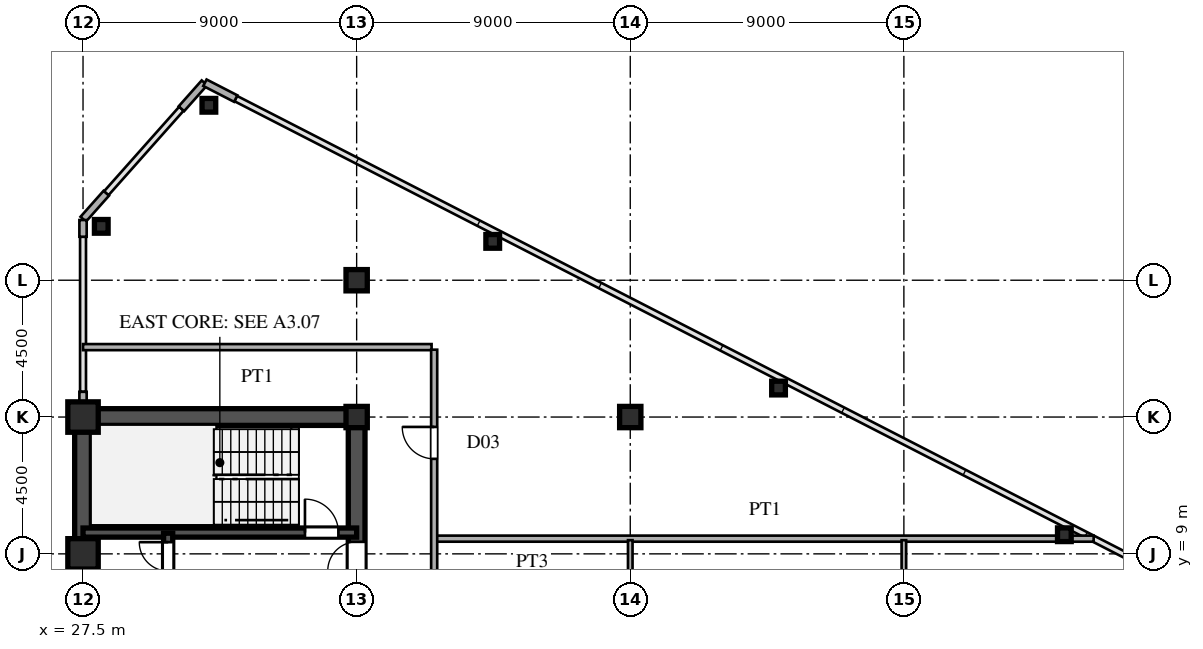
"""IFC4 building model, lengths in metres.
Left out: names, types, materials, properties, quantities, classifications, styles, units other than length and angle.
Written with IfcOpenShell. Run it as: python <this file> out.ifc"""

import sys

from ifc_helpers import new_model, si_unit, direction, frame, frame_2d, origin, origin_2d, place, context, subcontext, project, spatial, rectangle, hollow_rectangle, i_section, extrude, source, transform, mapped, element, fill, save


model = new_model("IFC4")
c1 = context("Model", 3, precision=1e-05, world=origin(), true_north=direction((0.0, 1.0)))
c2 = subcontext(c1, "Body", "Model", "MODEL_VIEW")
j1 = project(units=[si_unit("LENGTHUNIT", "METRE"), si_unit("PLANEANGLEUNIT", "RADIAN")], contexts=[c1])
p1 = place(None, origin())
s1 = spatial("IfcSite", under=j1, at=p1, CompositionType="ELEMENT")
p2 = place(p1, origin())
s2 = spatial("IfcBuilding", under=s1, at=p2, CompositionType="ELEMENT")
p3 = place(p2, frame((0.0, 0.0, 144.0)))
s3 = spatial("IfcBuildingStorey", under=s2, at=p3, CompositionType="ELEMENT", Elevation=144.0)
m1 = source(origin(), c2, "Body", "SweptSolid", [
    extrude(hollow_rectangle(XDim=1.0, YDim=1.0, WallThickness=0.042, at=origin_2d()), origin(), (0.0, 0.0, 1.0), 3.6),
])
for number, where, z_axis, x_axis in (
    (1, (27.5, 9.0, 0.0), (0.0, 0.0, 1.0), (1.0, 0.0, 0.0)),
    (2, (27.5, 13.5, 0.0), (0.0, 0.0, 1.0), (1.0, 0.0, 0.0)),
):
    element("IfcColumn", number, at=place(p3, frame(where, z_axis=z_axis, x_axis=x_axis)), inside=s3, PredefinedType="COLUMN", context=c2, shape_type="MappedRepresentation", body=[
        mapped(m1, transform((0.0, 0.0, 0.0), scale=1.0)),
    ])
m2 = source(origin(), c2, "Body", "SweptSolid", [
    extrude(i_section(OverallWidth=0.7, OverallDepth=0.7, WebThickness=0.028, FlangeThickness=0.045, at=origin_2d()), origin(), (0.0, 0.0, 1.0), 3.6),
])
for number, where, z_axis, x_axis in (
    (3, (36.5, 13.5, 0.0), (0.0, 0.0, 1.0), (1.0, 0.0, 0.0)),
    (4, (36.5, 18.0, 0.0), (0.0, 0.0, 1.0), (1.0, 0.0, 0.0)),
    (5, (45.5, 13.5, 0.0), (0.0, 0.0, 1.0), (1.0, 0.0, 0.0)),
):
    element("IfcColumn", number, at=place(p3, frame(where, z_axis=z_axis, x_axis=x_axis)), inside=s3, PredefinedType="COLUMN", context=c2, shape_type="MappedRepresentation", body=[
        mapped(m2, transform((0.0, 0.0, 0.0), scale=1.0)),
    ])
m3 = source(origin(), c2, "Body", "SweptSolid", [
    extrude(hollow_rectangle(XDim=0.45, YDim=0.45, WallThickness=0.018, at=origin_2d()), origin(), (0.0, 0.0, 1.0), 3.6),
])
for number, where, z_axis, x_axis in (
    (6, (31.64, 23.754, 0.0), (0.0, 0.0, 1.0), (1.0, 0.0, 0.0)),
    (7, (28.1, 19.772, 0.0), (0.0, 0.0, 1.0), (1.0, 0.0, 0.0)),
    (8, (40.976, 19.278, 0.0), (0.0, 0.0, 1.0), (1.0, 0.0, 0.0)),
    (9, (50.377, 14.453, 0.0), (0.0, 0.0, 1.0), (1.0, 0.0, 0.0)),
    (10, (59.779, 9.629, 0.0), (0.0, 0.0, 1.0), (1.0, 0.0, 0.0)),
):
    element("IfcColumn", number, at=place(p3, frame(where, z_axis=z_axis, x_axis=x_axis)), inside=s3, PredefinedType="COLUMN", context=c2, shape_type="MappedRepresentation", body=[
        mapped(m3, transform((0.0, 0.0, 0.0), scale=1.0)),
    ])
p4 = place(p3, frame((32.523, 23.975, 0.0), z_axis=(0.0, 0.0, 1.0), x_axis=(-0.889797395748, 0.456355776255, 0.0)))
e11 = element("IfcWall", 11, at=p4, inside=s3, PredefinedType="SOLIDWALL", context=c2, shape_type="SweptSolid", body=[
    extrude(rectangle(XDim=1.14, YDim=0.24, at=frame_2d((0.57, 0.0))), origin(), (0.0, 0.0, 1.0), 3.38),
])
for number, where, z_axis, x_axis in (
    (12, (31.493, 24.492, 0.0), (0.0, 0.0, 1.0), (-0.664, -0.747, 0.0)),
    (13, (28.264, 20.86, 0.0), (0.0, 0.0, 1.0), (-0.664, -0.747, 0.0)),
):
    element("IfcWall", number, at=place(p3, frame(where, z_axis=z_axis, x_axis=x_axis)), inside=s3, PredefinedType="SOLIDWALL", context=c2, shape_type="SweptSolid", body=[
        extrude(rectangle(XDim=1.14, YDim=0.24, at=frame_2d((0.57, 0.0))), origin(), (0.0, 0.0, 1.0), 3.38),
    ])
p5 = place(p3, frame((27.5, 13.78, 0.0), z_axis=(0.0, 0.0, 1.0), x_axis=(0.0, 1.0, 0.0)))
e14 = element("IfcWall", 14, at=p5, inside=s3, PredefinedType="SOLIDWALL", context=c2, shape_type="SweptSolid", body=[
    extrude(rectangle(XDim=0.55, YDim=0.24, at=frame_2d((0.275, 0.0))), origin(), (0.0, 0.0, 1.0), 2.88),
])
p6 = place(p3, frame((27.5, 19.43, 0.0), z_axis=(0.0, 0.0, 1.0), x_axis=(0.0, 1.0, 0.0)))
e15 = element("IfcWall", 15, at=p6, inside=s3, PredefinedType="SOLIDWALL", context=c2, shape_type="SweptSolid", body=[
    extrude(rectangle(XDim=0.55, YDim=0.24, at=frame_2d((0.275, 0.0))), origin(), (0.0, 0.0, 1.0), 3.38),
])
p7 = place(p3, frame((27.5, 1.3, 0.0), z_axis=(0.0, 0.0, 1.0), x_axis=(0.0, 1.0, 0.0)))
e16 = element("IfcWall", 16, at=p7, inside=s3, PredefinedType="SHEAR", context=c2, shape_type="SweptSolid", body=[
    extrude(rectangle(XDim=12.2, YDim=0.55, at=frame_2d((6.1, 0.0))), origin(), (0.0, 0.0, 1.0), 3.38),
])
p8 = place(p3, frame((27.5, 13.5, 0.0), z_axis=(0.0, 0.0, 1.0), x_axis=(1.0, 0.0, 0.0)))
e17 = element("IfcWall", 17, at=p8, inside=s3, PredefinedType="SHEAR", context=c2, shape_type="SweptSolid", body=[
    extrude(rectangle(XDim=9.0, YDim=0.55, at=frame_2d((4.5, 0.0))), origin(), (0.0, 0.0, 1.0), 3.38),
])
p9 = place(p3, frame((36.5, 8.2, 0.0), z_axis=(0.0, 0.0, 1.0), x_axis=(0.0, 1.0, 0.0)))
e18 = element("IfcWall", 18, at=p9, inside=s3, PredefinedType="SHEAR", context=c2, shape_type="SweptSolid", body=[
    extrude(rectangle(XDim=5.45, YDim=0.55, at=frame_2d((2.725, 0.0))), origin(), (0.0, 0.0, 1.0), 3.38),
])
p10 = place(p9, frame((0.245, 0.0, 0.0)))
e19 = element("IfcOpeningElement", 19, at=p10, cuts=e18, PredefinedType="OPENING", context=c2, shape_type="SweptSolid", body=[
    extrude(rectangle(XDim=0.95, YDim=2.15, at=frame_2d((0.475, 1.075))), frame((0.0, 0.285, 0.0), z_axis=(0.0, -1.0, 0.0), x_axis=(1.0, 0.0, 0.0)), (0.0, 0.0, 1.0), 0.57),
])
p11 = place(p3, frame((27.5, 9.7, 0.0), z_axis=(0.0, 0.0, 1.0), x_axis=(1.0, 0.0, 0.0)))
e20 = element("IfcWall", 20, at=p11, inside=s3, PredefinedType="SHEAR", context=c2, shape_type="SweptSolid", body=[
    extrude(rectangle(XDim=9.0, YDim=0.3, at=frame_2d((4.5, 0.0))), origin(), (0.0, 0.0, 1.0), 3.38),
])
p12 = place(p11, frame((7.3, 0.0, 0.0)))
e21 = element("IfcOpeningElement", 21, at=p12, cuts=e20, PredefinedType="OPENING", context=c2, shape_type="SweptSolid", body=[
    extrude(rectangle(XDim=1.1, YDim=2.2, at=frame_2d((0.55, 1.1))), frame((0.0, 0.16, 0.0), z_axis=(0.0, -1.0, 0.0), x_axis=(1.0, 0.0, 0.0)), (0.0, 0.0, 1.0), 0.32),
])
p13 = place(p3, frame((30.3, 8.15, 0.0), z_axis=(0.0, 0.0, 1.0), x_axis=(0.0, 1.0, 0.0)))
e22 = element("IfcWall", 22, at=p13, inside=s3, PredefinedType="SHEAR", context=c2, shape_type="SweptSolid", body=[
    extrude(rectangle(XDim=1.53, YDim=0.3, at=frame_2d((0.765, 0.0))), origin(), (0.0, 0.0, 1.0), 3.38),
])
p14 = place(p13, frame((0.285, 0.0, 0.0)))
e23 = element("IfcOpeningElement", 23, at=p14, cuts=e22, PredefinedType="OPENING", context=c2, shape_type="SweptSolid", body=[
    extrude(rectangle(XDim=0.95, YDim=2.15, at=frame_2d((0.475, 1.075))), frame((0.0, 0.16, 0.0), z_axis=(0.0, -1.0, 0.0), x_axis=(1.0, 0.0, 0.0)), (0.0, 0.0, 1.0), 0.32),
])
p15 = place(p3, frame((39.13, 9.5, 0.0), z_axis=(0.0, 0.0, 1.0), x_axis=(1.0, 0.0, 0.0)))
e24 = element("IfcWall", 24, at=p15, inside=s3, PredefinedType="PARTITIONING", context=c2, shape_type="SweptSolid", body=[
    extrude(rectangle(XDim=21.612, YDim=0.2, at=frame_2d((10.806, 0.0))), origin(), (0.0, 0.0, 1.0), 3.38),
])
p16 = place(p3, frame((27.5, 15.8, 0.0), z_axis=(0.0, 0.0, 1.0), x_axis=(1.0, 0.0, 0.0)))
e25 = element("IfcWall", 25, at=p16, inside=s3, PredefinedType="PARTITIONING", context=c2, shape_type="SweptSolid", body=[
    extrude(rectangle(XDim=11.465, YDim=0.2, at=frame_2d((5.732, 0.0))), origin(), (0.0, 0.0, 1.0), 3.38),
])
p17 = place(p3, frame((39.05, -15.715, 0.0), z_axis=(0.0, 0.0, 1.0), x_axis=(0.0, 1.0, 0.0)))
e26 = element("IfcWall", 26, at=p17, inside=s3, PredefinedType="PARTITIONING", context=c2, shape_type="SweptSolid", body=[
    extrude(rectangle(XDim=31.43, YDim=0.2, at=frame_2d((15.715, 0.0))), origin(), (0.0, 0.0, 1.0), 3.38),
])
p18 = place(p17, frame((1.54, 0.0, 0.0)))
e27 = element("IfcOpeningElement", 27, at=p18, cuts=e26, PredefinedType="OPENING", context=c2, shape_type="SweptSolid", body=[
    extrude(rectangle(XDim=1.05, YDim=2.25, at=frame_2d((0.525, 1.125))), frame((0.0, 0.11, 0.0), z_axis=(0.0, -1.0, 0.0), x_axis=(1.0, 0.0, 0.0)), (0.0, 0.0, 1.0), 0.22),
])
p19 = place(p17, frame((8.782, 0.0, 0.0)))
e28 = element("IfcOpeningElement", 28, at=p19, cuts=e26, PredefinedType="OPENING", context=c2, shape_type="SweptSolid", body=[
    extrude(rectangle(XDim=1.05, YDim=2.25, at=frame_2d((0.525, 1.125))), frame((0.0, 0.11, 0.0), z_axis=(0.0, -1.0, 0.0), x_axis=(1.0, 0.0, 0.0)), (0.0, 0.0, 1.0), 0.22),
])
p20 = place(p17, frame((19.282, 0.0, 0.0)))
e29 = element("IfcOpeningElement", 29, at=p20, cuts=e26, PredefinedType="OPENING", context=c2, shape_type="SweptSolid", body=[
    extrude(rectangle(XDim=1.05, YDim=2.25, at=frame_2d((0.525, 1.125))), frame((0.0, 0.11, 0.0), z_axis=(0.0, -1.0, 0.0), x_axis=(1.0, 0.0, 0.0)), (0.0, 0.0, 1.0), 0.22),
])
p21 = place(p17, frame((27.84, 0.0, 0.0)))
e30 = element("IfcOpeningElement", 30, at=p21, cuts=e26, PredefinedType="OPENING", context=c2, shape_type="SweptSolid", body=[
    extrude(rectangle(XDim=1.05, YDim=2.25, at=frame_2d((0.525, 1.125))), frame((0.0, 0.11, 0.0), z_axis=(0.0, -1.0, 0.0), x_axis=(1.0, 0.0, 0.0)), (0.0, 0.0, 1.0), 0.22),
])
p22 = place(p3, frame((45.5, 6.402, 0.0), z_axis=(0.0, 0.0, 1.0), x_axis=(0.0, 1.0, 0.0)))
e31 = element("IfcWall", 31, at=p22, inside=s3, PredefinedType="PARTITIONING", context=c2, shape_type="SweptSolid", body=[
    extrude(rectangle(XDim=3.048, YDim=0.15, at=frame_2d((1.524, 0.0))), origin(), (0.0, 0.0, 1.0), 2.78),
])
p23 = place(p3, frame((54.5, -11.45, 0.0), z_axis=(0.0, 0.0, 1.0), x_axis=(0.0, 1.0, 0.0)))
e32 = element("IfcWall", 32, at=p23, inside=s3, PredefinedType="PARTITIONING", context=c2, shape_type="SweptSolid", body=[
    extrude(rectangle(XDim=20.9, YDim=0.15, at=frame_2d((10.45, 0.0))), origin(), (0.0, 0.0, 1.0), 2.78),
])
p24 = place(p23, frame((4.725, 0.0, 0.0)))
e33 = element("IfcOpeningElement", 33, at=p24, cuts=e32, PredefinedType="OPENING", context=c2, shape_type="SweptSolid", body=[
    extrude(rectangle(XDim=0.95, YDim=2.15, at=frame_2d((0.475, 1.075))), frame((0.0, 0.085, 0.0), z_axis=(0.0, -1.0, 0.0), x_axis=(1.0, 0.0, 0.0)), (0.0, 0.0, 1.0), 0.17),
])
p25 = place(p23, frame((1.225, 0.0, 0.0)))
e34 = element("IfcOpeningElement", 34, at=p25, cuts=e32, PredefinedType="OPENING", context=c2, shape_type="SweptSolid", body=[
    extrude(rectangle(XDim=0.95, YDim=2.15, at=frame_2d((0.475, 1.075))), frame((0.0, 0.085, 0.0), z_axis=(0.0, -1.0, 0.0), x_axis=(1.0, 0.0, 0.0)), (0.0, 0.0, 1.0), 0.17),
])
p26 = place(p23, frame((8.225, 0.0, 0.0)))
e35 = element("IfcOpeningElement", 35, at=p26, cuts=e32, PredefinedType="OPENING", context=c2, shape_type="SweptSolid", body=[
    extrude(rectangle(XDim=0.95, YDim=2.15, at=frame_2d((0.475, 1.075))), frame((0.0, 0.085, 0.0), z_axis=(0.0, -1.0, 0.0), x_axis=(1.0, 0.0, 0.0)), (0.0, 0.0, 1.0), 0.17),
])
p27 = place(p23, frame((14.552, 0.0, 0.0)))
e36 = element("IfcOpeningElement", 36, at=p27, cuts=e32, PredefinedType="OPENING", context=c2, shape_type="SweptSolid", body=[
    extrude(rectangle(XDim=0.95, YDim=2.15, at=frame_2d((0.475, 1.075))), frame((0.0, 0.085, 0.0), z_axis=(0.0, -1.0, 0.0), x_axis=(1.0, 0.0, 0.0)), (0.0, 0.0, 1.0), 0.17),
])
m4 = source(origin(), c2, "Body", "SweptSolid", [
    extrude(rectangle(XDim=0.95, YDim=2.15, at=frame_2d((0.475, 1.075))), frame((0.0, 0.025, 0.0), z_axis=(0.0, -1.0, 0.0), x_axis=(1.0, 0.0, 0.0)), (0.0, 0.0, 1.0), 0.05),
])
p28 = place(p10, origin())
e37 = element("IfcDoor", 37, at=p28, inside=s3, OperationType="SINGLE_SWING_LEFT", PredefinedType="DOOR", context=c2, shape_type="MappedRepresentation", body=[
    mapped(m4, transform((0.0, 0.0, 0.0), scale=1.0)),
])
fill(e19, e37)
m5 = source(origin(), c2, "Body", "SweptSolid", [
    extrude(rectangle(XDim=1.1, YDim=2.2, at=frame_2d((0.55, 1.1))), frame((0.0, 0.025, 0.0), z_axis=(0.0, -1.0, 0.0), x_axis=(1.0, 0.0, 0.0)), (0.0, 0.0, 1.0), 0.05),
])
p29 = place(p12, origin())
e38 = element("IfcDoor", 38, at=p29, inside=s3, OperationType="SINGLE_SWING_LEFT", PredefinedType="DOOR", context=c2, shape_type="MappedRepresentation", body=[
    mapped(m5, transform((0.0, 0.0, 0.0), scale=1.0)),
])
fill(e21, e38)
p30 = place(p14, origin())
e39 = element("IfcDoor", 39, at=p30, inside=s3, OperationType="SINGLE_SWING_RIGHT", PredefinedType="DOOR", context=c2, shape_type="MappedRepresentation", body=[
    mapped(m4, transform((0.0, 0.0, 0.0), scale=1.0)),
])
fill(e23, e39)
m6 = source(origin(), c2, "Body", "SweptSolid", [
    extrude(rectangle(XDim=1.05, YDim=2.25, at=frame_2d((0.525, 1.125))), frame((0.0, 0.025, 0.0), z_axis=(0.0, -1.0, 0.0), x_axis=(1.0, 0.0, 0.0)), (0.0, 0.0, 1.0), 0.05),
])
p31 = place(p21, origin())
e40 = element("IfcDoor", 40, at=p31, inside=s3, OperationType="SINGLE_SWING_RIGHT", PredefinedType="DOOR", context=c2, shape_type="MappedRepresentation", body=[
    mapped(m6, transform((0.0, 0.0, 0.0), scale=1.0)),
])
fill(e30, e40)
save(model, sys.argv[1])
